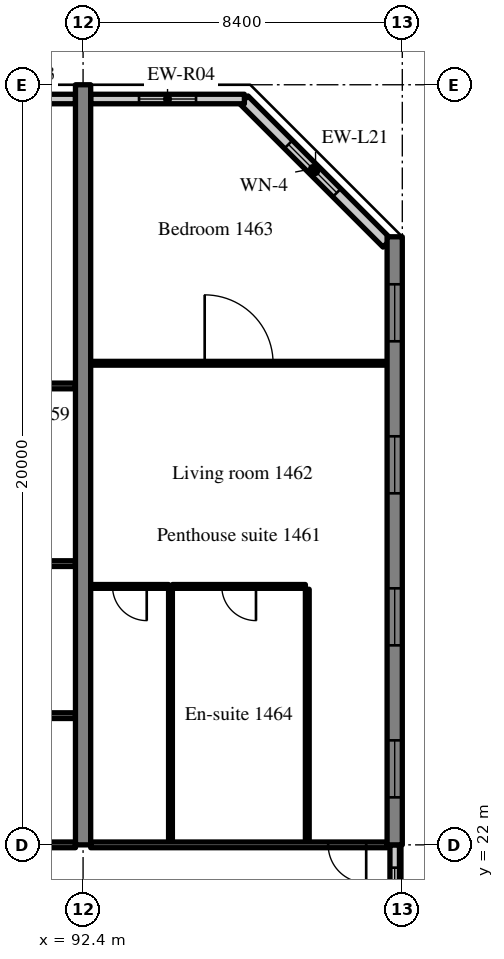
"""IFC4 building model, lengths in metres.
Left out: names, types, materials, properties, quantities, classifications, styles, units other than length and angle.
Written with IfcOpenShell. Run it as: python <this file> out.ifc"""

import sys

from ifc_helpers import new_model, si_unit, direction, frame, frame_2d, origin, place, context, subcontext, project, spatial, rectangle, extrude, source, transform, mapped, element, fill, save


model = new_model("IFC4")
c1 = context("Model", 3, precision=1e-05, world=origin(), true_north=direction((0.0, 1.0)))
c2 = subcontext(c1, "Body", "Model", "MODEL_VIEW")
j1 = project(units=[si_unit("LENGTHUNIT", "METRE"), si_unit("PLANEANGLEUNIT", "RADIAN")], contexts=[c1])
p1 = place(None, origin())
s1 = spatial("IfcSite", under=j1, at=p1, CompositionType="ELEMENT")
p2 = place(p1, origin())
s2 = spatial("IfcBuilding", under=s1, at=p2, CompositionType="ELEMENT")
p3 = place(p2, frame((0.0, 0.0, 62.0)))
s3 = spatial("IfcBuildingStorey", under=s2, at=p3, CompositionType="ELEMENT", Elevation=62.0)
m1 = source(origin(), c2, "Body", "SweptSolid", [
    extrude(rectangle(XDim=20.0, YDim=0.4, at=frame_2d((10.0, 0.0))), origin(), (0.0, 0.0, 1.0), 3.52),
])
p4 = place(p3, frame((92.4, 22.0, 0.0), z_axis=(0.0, 0.0, 1.0), x_axis=(0.0, 1.0, 0.0)))
e1 = element("IfcWall", 1, at=p4, inside=s3, PredefinedType="SHEAR", context=c2, shape_type="MappedRepresentation", body=[
    mapped(m1, transform((0.0, 0.0, 0.0), scale=1.0)),
])
m2 = source(origin(), c2, "Body", "SweptSolid", [
    extrude(rectangle(XDim=16.0, YDim=0.4, at=frame_2d((8.0, 0.0))), origin(), (0.0, 0.0, 1.0), 3.52),
])
p5 = place(p3, frame((100.6, 22.0, 0.0), z_axis=(0.0, 0.0, 1.0), x_axis=(0.0, 1.0, 0.0)))
e2 = element("IfcWall", 2, at=p5, inside=s3, PredefinedType="SHEAR", context=c2, shape_type="MappedRepresentation", body=[
    mapped(m2, transform((0.0, 0.0, 0.0), scale=1.0)),
])
m3 = source(origin(), c2, "Body", "SweptSolid", [
    extrude(rectangle(XDim=1.5, YDim=1.5, at=frame_2d((0.75, 0.75))), frame((0.0, 0.21, 0.0), z_axis=(0.0, -1.0, 0.0), x_axis=(1.0, 0.0, 0.0)), (0.0, 0.0, 1.0), 0.42),
])
p6 = place(p5, frame((1.25, 0.0, 0.9)))
e3 = element("IfcOpeningElement", 3, at=p6, cuts=e2, PredefinedType="OPENING", context=c2, shape_type="MappedRepresentation", body=[
    mapped(m3, transform((0.0, 0.0, 0.0), scale=1.0)),
])
p7 = place(p5, frame((5.25, 0.0, 0.9)))
e4 = element("IfcOpeningElement", 4, at=p7, cuts=e2, PredefinedType="OPENING", context=c2, shape_type="MappedRepresentation", body=[
    mapped(m3, transform((0.0, 0.0, 0.0), scale=1.0)),
])
p8 = place(p5, frame((9.25, 0.0, 0.9)))
e5 = element("IfcOpeningElement", 5, at=p8, cuts=e2, PredefinedType="OPENING", context=c2, shape_type="MappedRepresentation", body=[
    mapped(m3, transform((0.0, 0.0, 0.0), scale=1.0)),
])
p9 = place(p5, frame((13.25, 0.0, 0.9)))
e6 = element("IfcOpeningElement", 6, at=p9, cuts=e2, PredefinedType="OPENING", context=c2, shape_type="MappedRepresentation", body=[
    mapped(m3, transform((0.0, 0.0, 0.0), scale=1.0)),
])
m4 = source(origin(), c2, "Body", "SweptSolid", [
    extrude(rectangle(XDim=5.326, YDim=0.3, at=frame_2d((2.663, 0.0))), origin(), (0.0, 0.0, 1.0), 3.52),
])
p10 = place(p3, frame((100.4, 37.834, 0.0), z_axis=(0.0, 0.0, 1.0), x_axis=(-0.707083859269, 0.707129702361, 0.0)))
e7 = element("IfcWall", 7, at=p10, inside=s3, PredefinedType="SOLIDWALL", context=c2, shape_type="MappedRepresentation", body=[
    mapped(m4, transform((0.0, 0.0, 0.0), scale=1.0)),
])
m5 = source(origin(), c2, "Body", "SweptSolid", [
    extrude(rectangle(XDim=1.8, YDim=1.5, at=frame_2d((0.9, 0.75))), frame((0.0, 0.16, 0.0), z_axis=(0.0, -1.0, 0.0), x_axis=(1.0, 0.0, 0.0)), (0.0, 0.0, 1.0), 0.32),
])
p11 = place(p10, frame((1.871, 0.0, 0.9)))
e8 = element("IfcOpeningElement", 8, at=p11, cuts=e7, PredefinedType="OPENING", context=c2, shape_type="MappedRepresentation", body=[
    mapped(m5, transform((0.0, 0.0, 0.0), scale=1.0)),
])
m6 = source(origin(), c2, "Body", "SweptSolid", [
    extrude(rectangle(XDim=3.6, YDim=0.25, at=frame_2d((1.8, 0.0))), origin(), (0.0, 0.0, 1.0), 2.82),
])
p12 = place(p3, frame((92.2, 41.625, 0.0), z_axis=(0.0, 0.0, 1.0), x_axis=(-1.0, 0.0, 0.0)))
e9 = element("IfcWall", 9, at=p12, inside=s3, PredefinedType="SOLIDWALL", context=c2, shape_type="MappedRepresentation", body=[
    mapped(m6, transform((0.0, 0.0, 0.0), scale=1.0)),
])
m7 = source(origin(), c2, "Body", "SweptSolid", [
    extrude(rectangle(XDim=1.5, YDim=1.5, at=frame_2d((0.75, 0.75))), frame((0.0, 0.135, 0.0), z_axis=(0.0, -1.0, 0.0), x_axis=(1.0, 0.0, 0.0)), (0.0, 0.0, 1.0), 0.27),
])
p13 = place(p12, frame((1.05, 0.0, 0.9)))
e10 = element("IfcOpeningElement", 10, at=p13, cuts=e9, PredefinedType="OPENING", context=c2, shape_type="MappedRepresentation", body=[
    mapped(m7, transform((0.0, 0.0, 0.0), scale=1.0)),
])
m8 = source(origin(), c2, "Body", "SweptSolid", [
    extrude(rectangle(XDim=4.045, YDim=0.25, at=frame_2d((2.022, 0.0))), origin(), (0.0, 0.0, 1.0), 2.82),
])
p14 = place(p3, frame((96.645, 41.625, 0.0), z_axis=(0.0, 0.0, 1.0), x_axis=(-1.0, 0.0, 0.0)))
e11 = element("IfcWall", 11, at=p14, inside=s3, PredefinedType="SOLIDWALL", context=c2, shape_type="MappedRepresentation", body=[
    mapped(m8, transform((0.0, 0.0, 0.0), scale=1.0)),
])
p15 = place(p14, frame((1.272, 0.0, 0.9)))
e12 = element("IfcOpeningElement", 12, at=p15, cuts=e11, PredefinedType="OPENING", context=c2, shape_type="MappedRepresentation", body=[
    mapped(m7, transform((0.0, 0.0, 0.0), scale=1.0)),
])
m9 = source(origin(), c2, "Body", "SweptSolid", [
    extrude(rectangle(XDim=2.4, YDim=0.25, at=frame_2d((1.2, 0.0))), origin(), (0.0, 0.0, 1.0), 2.62),
])
p16 = place(p3, frame((100.6, 19.6, 0.0), z_axis=(0.0, 0.0, 1.0), x_axis=(0.0, 1.0, 0.0)))
e13 = element("IfcWall", 13, at=p16, inside=s3, PredefinedType="SOLIDWALL", context=c2, shape_type="MappedRepresentation", body=[
    mapped(m9, transform((0.0, 0.0, 0.0), scale=1.0)),
])
m10 = source(origin(), c2, "Body", "SweptSolid", [
    extrude(rectangle(XDim=1.2, YDim=1.5, at=frame_2d((0.6, 0.75))), frame((0.0, 0.135, 0.0), z_axis=(0.0, -1.0, 0.0), x_axis=(1.0, 0.0, 0.0)), (0.0, 0.0, 1.0), 0.27),
])
p17 = place(p16, frame((0.6, 0.0, 0.9)))
e14 = element("IfcOpeningElement", 14, at=p17, cuts=e13, PredefinedType="OPENING", context=c2, shape_type="MappedRepresentation", body=[
    mapped(m10, transform((0.0, 0.0, 0.0), scale=1.0)),
])
m11 = source(origin(), c2, "Body", "SweptSolid", [
    extrude(rectangle(XDim=5.45, YDim=0.15, at=frame_2d((2.725, 0.0))), origin(), (0.0, 0.0, 1.0), 2.82),
])
p18 = place(p3, frame((86.75, 22.0, 0.0), z_axis=(0.0, 0.0, 1.0), x_axis=(1.0, 0.0, 0.0)))
e15 = element("IfcWall", 15, at=p18, inside=s3, PredefinedType="PARTITIONING", context=c2, shape_type="MappedRepresentation", body=[
    mapped(m11, transform((0.0, 0.0, 0.0), scale=1.0)),
])
m12 = source(origin(), c2, "Body", "SweptSolid", [
    extrude(rectangle(XDim=5.45, YDim=0.15, at=frame_2d((2.725, 0.0))), origin(), (0.0, 0.0, 1.0), 3.52),
])
for number, where, z_axis, x_axis in (
    (16, (86.75, 25.4, 0.0), (0.0, 0.0, 1.0), (1.0, 0.0, 0.0)),
    (17, (86.75, 29.4, 0.0), (0.0, 0.0, 1.0), (1.0, 0.0, 0.0)),
):
    element("IfcWall", number, at=place(p3, frame(where, z_axis=z_axis, x_axis=x_axis)), inside=s3, PredefinedType="PARTITIONING", context=c2, shape_type="MappedRepresentation", body=[
        mapped(m12, transform((0.0, 0.0, 0.0), scale=1.0)),
    ])
m13 = source(origin(), c2, "Body", "SweptSolid", [
    extrude(rectangle(XDim=8.0, YDim=0.15, at=frame_2d((4.0, 0.0))), origin(), (0.0, 0.0, 1.0), 3.52),
])
p19 = place(p3, frame((84.2, 34.075, 0.0), z_axis=(0.0, 0.0, 1.0), x_axis=(1.0, 0.0, 0.0)))
e18 = element("IfcWall", 18, at=p19, inside=s3, PredefinedType="PARTITIONING", context=c2, shape_type="MappedRepresentation", body=[
    mapped(m13, transform((0.0, 0.0, 0.0), scale=1.0)),
])
m14 = source(origin(), c2, "Body", "SweptSolid", [
    extrude(rectangle(XDim=1.0, YDim=2.1, at=frame_2d((0.5, 1.05))), frame((0.0, 0.085, 0.0), z_axis=(0.0, -1.0, 0.0), x_axis=(1.0, 0.0, 0.0)), (0.0, 0.0, 1.0), 0.17),
])
p20 = place(p19, frame((0.7, 0.0, 0.0)))
e19 = element("IfcOpeningElement", 19, at=p20, cuts=e18, PredefinedType="OPENING", context=c2, shape_type="MappedRepresentation", body=[
    mapped(m14, transform((0.0, 0.0, 0.0), scale=1.0)),
])
m15 = source(origin(), c2, "Body", "SweptSolid", [
    extrude(rectangle(XDim=6.65, YDim=0.1, at=frame_2d((3.325, 0.0))), origin(), (0.0, 0.0, 1.0), 3.52),
])
for number, where, z_axis, x_axis in (
    (20, (98.3, 22.075, 0.0), (0.0, 0.0, 1.0), (0.0, 1.0, 0.0)),
    (21, (94.7, 22.075, 0.0), (0.0, 0.0, 1.0), (0.0, 1.0, 0.0)),
):
    element("IfcWall", number, at=place(p3, frame(where, z_axis=z_axis, x_axis=x_axis)), inside=s3, PredefinedType="PARTITIONING", context=c2, shape_type="MappedRepresentation", body=[
        mapped(m15, transform((0.0, 0.0, 0.0), scale=1.0)),
    ])
m16 = source(origin(), c2, "Body", "SweptSolid", [
    extrude(rectangle(XDim=3.5, YDim=0.1, at=frame_2d((1.75, 0.0))), origin(), (0.0, 0.0, 1.0), 3.52),
])
p21 = place(p3, frame((94.75, 28.8, 0.0), z_axis=(0.0, 0.0, 1.0), x_axis=(1.0, 0.0, 0.0)))
e22 = element("IfcWall", 22, at=p21, inside=s3, PredefinedType="PARTITIONING", context=c2, shape_type="MappedRepresentation", body=[
    mapped(m16, transform((0.0, 0.0, 0.0), scale=1.0)),
])
m17 = source(origin(), c2, "Body", "SweptSolid", [
    extrude(rectangle(XDim=0.9, YDim=2.1, at=frame_2d((0.45, 1.05))), frame((0.0, 0.06, 0.0), z_axis=(0.0, -1.0, 0.0), x_axis=(1.0, 0.0, 0.0)), (0.0, 0.0, 1.0), 0.12),
])
p22 = place(p21, frame((1.3, 0.0, 0.0)))
e23 = element("IfcOpeningElement", 23, at=p22, cuts=e22, PredefinedType="OPENING", context=c2, shape_type="MappedRepresentation", body=[
    mapped(m17, transform((0.0, 0.0, 0.0), scale=1.0)),
])
m18 = source(origin(), c2, "Body", "SweptSolid", [
    extrude(rectangle(XDim=2.05, YDim=0.1, at=frame_2d((1.025, 0.0))), origin(), (0.0, 0.0, 1.0), 3.52),
])
p23 = place(p3, frame((92.6, 28.8, 0.0), z_axis=(0.0, 0.0, 1.0), x_axis=(1.0, 0.0, 0.0)))
e24 = element("IfcWall", 24, at=p23, inside=s3, PredefinedType="PARTITIONING", context=c2, shape_type="MappedRepresentation", body=[
    mapped(m18, transform((0.0, 0.0, 0.0), scale=1.0)),
])
p24 = place(p23, frame((0.575, 0.0, 0.0)))
e25 = element("IfcOpeningElement", 25, at=p24, cuts=e24, PredefinedType="OPENING", context=c2, shape_type="MappedRepresentation", body=[
    mapped(m17, transform((0.0, 0.0, 0.0), scale=1.0)),
])
m19 = source(origin(), c2, "Body", "SweptSolid", [
    extrude(rectangle(XDim=7.8, YDim=0.1, at=frame_2d((3.9, 0.0))), origin(), (0.0, 0.0, 1.0), 3.52),
])
p25 = place(p3, frame((92.6, 34.672, 0.0), z_axis=(0.0, 0.0, 1.0), x_axis=(1.0, 0.0, 0.0)))
e26 = element("IfcWall", 26, at=p25, inside=s3, PredefinedType="PARTITIONING", context=c2, shape_type="MappedRepresentation", body=[
    mapped(m19, transform((0.0, 0.0, 0.0), scale=1.0)),
])
m20 = source(origin(), c2, "Body", "SweptSolid", [
    extrude(rectangle(XDim=1.8, YDim=2.1, at=frame_2d((0.9, 1.05))), frame((0.0, 0.06, 0.0), z_axis=(0.0, -1.0, 0.0), x_axis=(1.0, 0.0, 0.0)), (0.0, 0.0, 1.0), 0.12),
])
p26 = place(p25, frame((3.0, 0.0, 0.0)))
e27 = element("IfcOpeningElement", 27, at=p26, cuts=e26, PredefinedType="OPENING", context=c2, shape_type="MappedRepresentation", body=[
    mapped(m20, transform((0.0, 0.0, 0.0), scale=1.0)),
])
m21 = source(origin(), c2, "Body", "SweptSolid", [
    extrude(rectangle(XDim=7.8, YDim=0.15, at=frame_2d((3.9, 0.0))), origin(), (0.0, 0.0, 1.0), 2.82),
])
p27 = place(p3, frame((92.6, 22.0, 0.0), z_axis=(0.0, 0.0, 1.0), x_axis=(1.0, 0.0, 0.0)))
e28 = element("IfcWall", 28, at=p27, inside=s3, PredefinedType="PARTITIONING", context=c2, shape_type="MappedRepresentation", body=[
    mapped(m21, transform((0.0, 0.0, 0.0), scale=1.0)),
])
p28 = place(p27, frame((6.25, 0.0, 0.0)))
e29 = element("IfcOpeningElement", 29, at=p28, cuts=e28, PredefinedType="OPENING", context=c2, shape_type="MappedRepresentation", body=[
    mapped(m14, transform((0.0, 0.0, 0.0), scale=1.0)),
])
m22 = source(origin(), c2, "Body", "SweptSolid", [
    extrude(rectangle(XDim=1.8, YDim=1.5, at=frame_2d((0.9, 0.75))), frame((0.0, 0.03, 0.0), z_axis=(0.0, -1.0, 0.0), x_axis=(1.0, 0.0, 0.0)), (0.0, 0.0, 1.0), 0.06),
])
p29 = place(p11, origin())
e30 = element("IfcWindow", 30, at=p29, inside=s3, PartitioningType="SINGLE_PANEL", PredefinedType="WINDOW", context=c2, shape_type="MappedRepresentation", body=[
    mapped(m22, transform((0.0, 0.0, 0.0), scale=1.0)),
])
fill(e8, e30)
m23 = source(origin(), c2, "Body", "SweptSolid", [
    extrude(rectangle(XDim=1.5, YDim=1.5, at=frame_2d((0.75, 0.75))), frame((0.0, 0.03, 0.0), z_axis=(0.0, -1.0, 0.0), x_axis=(1.0, 0.0, 0.0)), (0.0, 0.0, 1.0), 0.06),
])
p30 = place(p15, origin())
e31 = element("IfcWindow", 31, at=p30, inside=s3, PartitioningType="SINGLE_PANEL", PredefinedType="WINDOW", context=c2, shape_type="MappedRepresentation", body=[
    mapped(m23, transform((0.0, 0.0, 0.0), scale=1.0)),
])
fill(e12, e31)
p31 = place(p6, origin())
e32 = element("IfcWindow", 32, at=p31, inside=s3, PartitioningType="SINGLE_PANEL", PredefinedType="WINDOW", context=c2, shape_type="MappedRepresentation", body=[
    mapped(m23, transform((0.0, 0.0, 0.0), scale=1.0)),
])
fill(e3, e32)
p32 = place(p7, origin())
e33 = element("IfcWindow", 33, at=p32, inside=s3, PartitioningType="SINGLE_PANEL", PredefinedType="WINDOW", context=c2, shape_type="MappedRepresentation", body=[
    mapped(m23, transform((0.0, 0.0, 0.0), scale=1.0)),
])
fill(e4, e33)
p33 = place(p8, origin())
e34 = element("IfcWindow", 34, at=p33, inside=s3, PartitioningType="SINGLE_PANEL", PredefinedType="WINDOW", context=c2, shape_type="MappedRepresentation", body=[
    mapped(m23, transform((0.0, 0.0, 0.0), scale=1.0)),
])
fill(e5, e34)
p34 = place(p9, origin())
e35 = element("IfcWindow", 35, at=p34, inside=s3, PartitioningType="SINGLE_PANEL", PredefinedType="WINDOW", context=c2, shape_type="MappedRepresentation", body=[
    mapped(m23, transform((0.0, 0.0, 0.0), scale=1.0)),
])
fill(e6, e35)
m24 = source(origin(), c2, "Body", "SweptSolid", [
    extrude(rectangle(XDim=1.2, YDim=1.5, at=frame_2d((0.6, 0.75))), frame((0.0, 0.03, 0.0), z_axis=(0.0, -1.0, 0.0), x_axis=(1.0, 0.0, 0.0)), (0.0, 0.0, 1.0), 0.06),
])
p35 = place(p17, origin())
e36 = element("IfcWindow", 36, at=p35, inside=s3, PartitioningType="SINGLE_PANEL", PredefinedType="WINDOW", context=c2, shape_type="MappedRepresentation", body=[
    mapped(m24, transform((0.0, 0.0, 0.0), scale=1.0)),
])
fill(e14, e36)
m25 = source(origin(), c2, "Body", "SweptSolid", [
    extrude(rectangle(XDim=0.9, YDim=2.1, at=frame_2d((0.45, 1.05))), frame((0.0, 0.025, 0.0), z_axis=(0.0, -1.0, 0.0), x_axis=(1.0, 0.0, 0.0)), (0.0, 0.0, 1.0), 0.05),
])
p36 = place(p22, origin())
e37 = element("IfcDoor", 37, at=p36, inside=s3, OperationType="SINGLE_SWING_RIGHT", PredefinedType="DOOR", context=c2, shape_type="MappedRepresentation", body=[
    mapped(m25, transform((0.0, 0.0, 0.0), scale=1.0)),
])
fill(e23, e37)
p37 = place(p24, origin())
e38 = element("IfcDoor", 38, at=p37, inside=s3, OperationType="SINGLE_SWING_RIGHT", PredefinedType="DOOR", context=c2, shape_type="MappedRepresentation", body=[
    mapped(m25, transform((0.0, 0.0, 0.0), scale=1.0)),
])
fill(e25, e38)
m26 = source(origin(), c2, "Body", "SweptSolid", [
    extrude(rectangle(XDim=1.8, YDim=2.1, at=frame_2d((0.9, 1.05))), frame((0.0, 0.025, 0.0), z_axis=(0.0, -1.0, 0.0), x_axis=(1.0, 0.0, 0.0)), (0.0, 0.0, 1.0), 0.05),
])
p38 = place(p26, origin())
e39 = element("IfcDoor", 39, at=p38, inside=s3, OperationType="DOUBLE_DOOR_SINGLE_SWING", PredefinedType="DOOR", context=c2, shape_type="MappedRepresentation", body=[
    mapped(m26, transform((0.0, 0.0, 0.0), scale=1.0)),
])
fill(e27, e39)
m27 = source(origin(), c2, "Body", "SweptSolid", [
    extrude(rectangle(XDim=1.0, YDim=2.1, at=frame_2d((0.5, 1.05))), frame((0.0, 0.025, 0.0), z_axis=(0.0, -1.0, 0.0), x_axis=(1.0, 0.0, 0.0)), (0.0, 0.0, 1.0), 0.05),
])
p39 = place(p28, origin())
e40 = element("IfcDoor", 40, at=p39, inside=s3, OperationType="SINGLE_SWING_RIGHT", PredefinedType="DOOR", context=c2, shape_type="MappedRepresentation", body=[
    mapped(m27, transform((0.0, 0.0, 0.0), scale=1.0)),
])
fill(e29, e40)
save(model, sys.argv[1])
